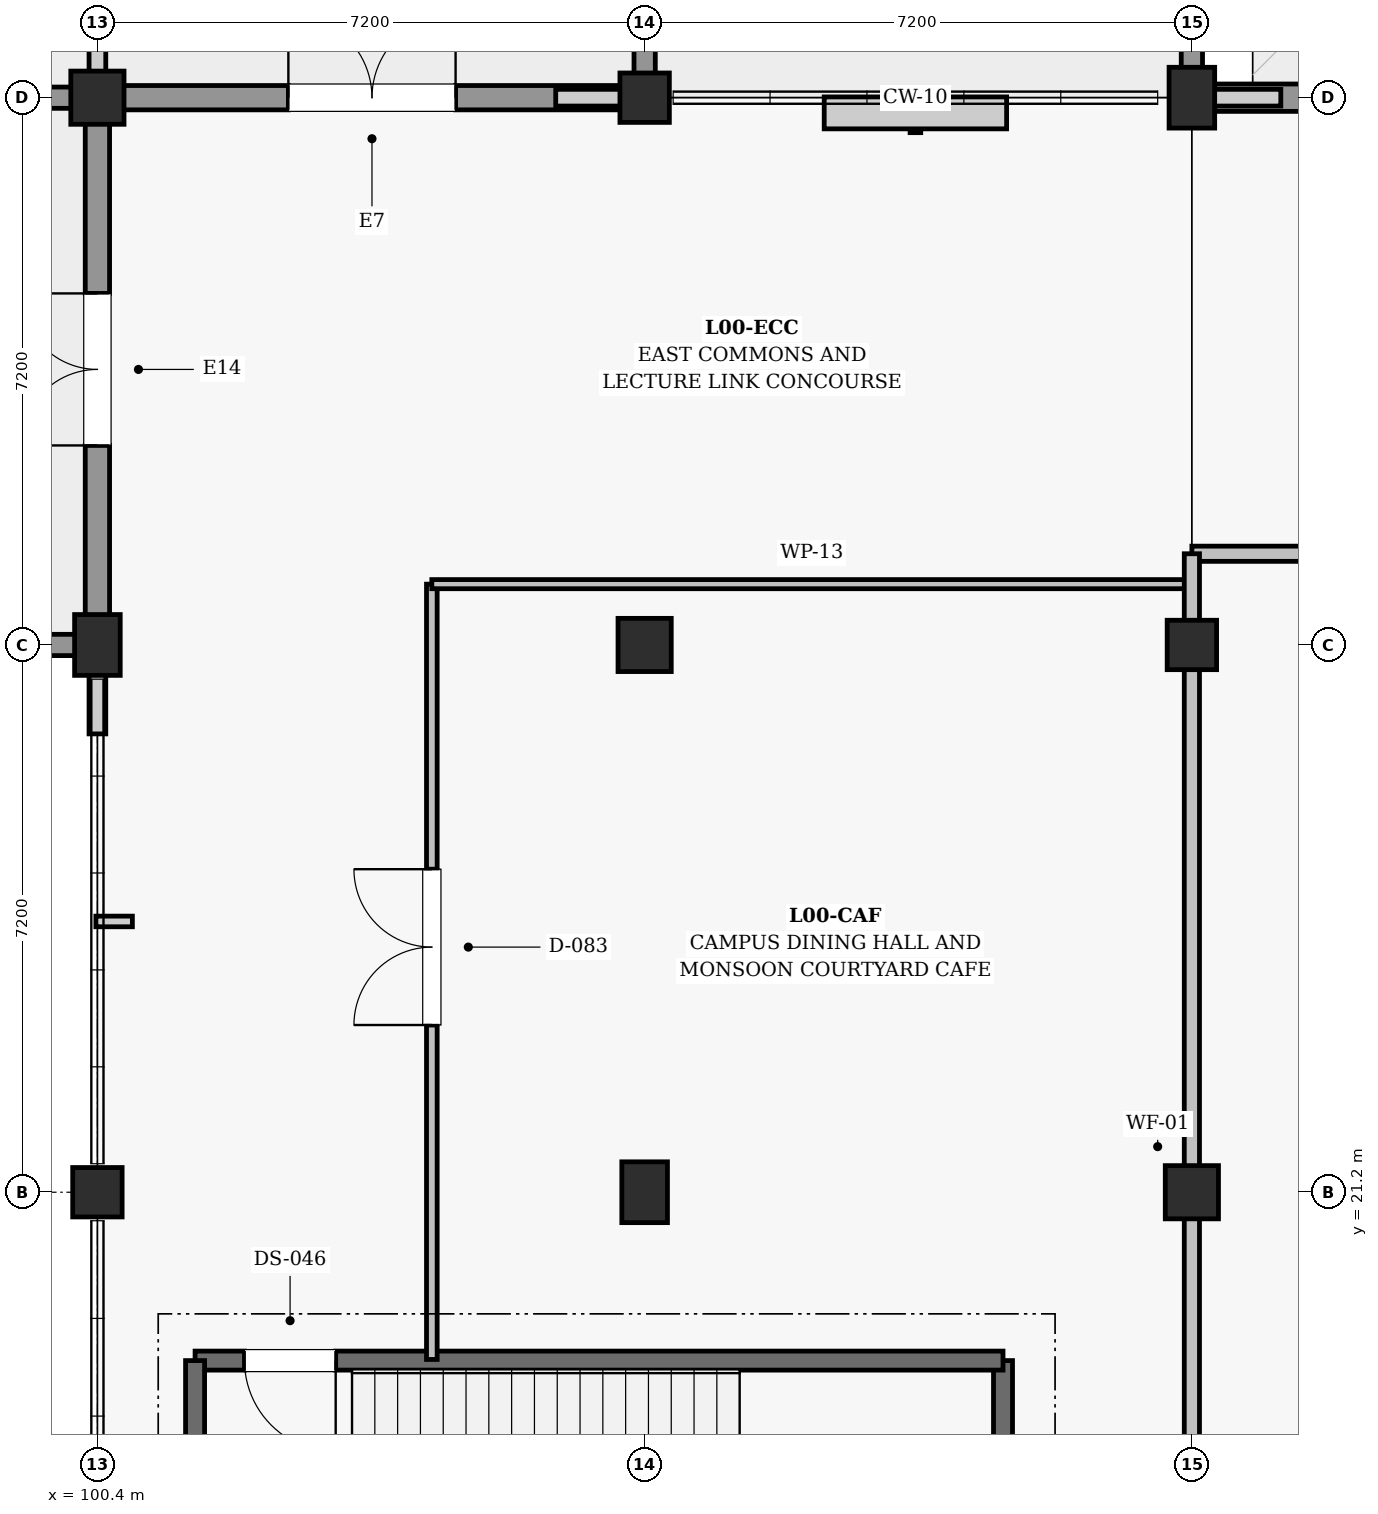
"""IFC4 building model, lengths in metres.
Left out: names, types, materials, properties, quantities, classifications, styles, units other than length and angle.
Written with IfcOpenShell. Run it as: python <this file> out.ifc"""

import sys

from ifc_helpers import new_model, si_unit, direction, frame, frame_2d, origin, origin_2d, place, context, subcontext, project, spatial, polyline, rectangle, outline, extrude, element, fill, save


model = new_model("IFC4")
c1 = context("Model", 3, precision=1e-05, world=origin(), true_north=direction((0.0, 1.0)))
c2 = subcontext(c1, "Body", "Model", "MODEL_VIEW")
j1 = project(units=[si_unit("LENGTHUNIT", "METRE"), si_unit("PLANEANGLEUNIT", "RADIAN")], contexts=[c1])
p1 = place(None, origin())
s1 = spatial("IfcSite", under=j1, at=p1, CompositionType="ELEMENT")
p2 = place(p1, origin())
s2 = spatial("IfcBuilding", under=s1, at=p2, CompositionType="ELEMENT")
p3 = place(p2, origin())
s3 = spatial("IfcBuildingStorey", under=s2, at=p3, CompositionType="ELEMENT", Elevation=0.0)
p4 = place(p3, frame((100.4, 21.2, 0.0), z_axis=(0.0, 0.0, 1.0), x_axis=(1.0, 0.0, 0.0)))
e1 = element("IfcColumn", 1, at=p4, inside=s3, PredefinedType="COLUMN", context=c2, shape_type="SweptSolid", body=[
    extrude(rectangle(XDim=0.65, YDim=0.65, at=origin_2d()), origin(), (0.0, 0.0, 1.0), 5.4),
])
p5 = place(p3, frame((100.4, 28.4, 0.0), z_axis=(0.0, 0.0, 1.0), x_axis=(1.0, 0.0, 0.0)))
e2 = element("IfcColumn", 2, at=p5, inside=s3, PredefinedType="COLUMN", context=c2, shape_type="SweptSolid", body=[
    extrude(rectangle(XDim=0.6, YDim=0.8, at=origin_2d()), origin(), (0.0, 0.0, 1.0), 5.4),
])
p6 = place(p3, frame((100.4, 35.6, 0.0), z_axis=(0.0, 0.0, 1.0), x_axis=(1.0, 0.0, 0.0)))
e3 = element("IfcColumn", 3, at=p6, inside=s3, PredefinedType="COLUMN", context=c2, shape_type="SweptSolid", body=[
    extrude(rectangle(XDim=0.7, YDim=0.7, at=origin_2d()), origin(), (0.0, 0.0, 1.0), 5.4),
])
p7 = place(p3, frame((107.6, 21.2, 0.0), z_axis=(0.0, 0.0, 1.0), x_axis=(1.0, 0.0, 0.0)))
e4 = element("IfcColumn", 4, at=p7, inside=s3, PredefinedType="COLUMN", context=c2, shape_type="SweptSolid", body=[
    extrude(rectangle(XDim=0.6, YDim=0.8, at=origin_2d()), origin(), (0.0, 0.0, 1.0), 5.4),
])
p8 = place(p3, frame((107.6, 28.4, 0.0), z_axis=(0.0, 0.0, 1.0), x_axis=(1.0, 0.0, 0.0)))
e5 = element("IfcColumn", 5, at=p8, inside=s3, PredefinedType="COLUMN", context=c2, shape_type="SweptSolid", body=[
    extrude(rectangle(XDim=0.7, YDim=0.7, at=origin_2d()), origin(), (0.0, 0.0, 1.0), 5.4),
])
p9 = place(p3, frame((107.6, 35.6, 0.0), z_axis=(0.0, 0.0, 1.0), x_axis=(1.0, 0.0, 0.0)))
e6 = element("IfcColumn", 6, at=p9, inside=s3, PredefinedType="COLUMN", context=c2, shape_type="SweptSolid", body=[
    extrude(rectangle(XDim=0.65, YDim=0.65, at=origin_2d()), origin(), (0.0, 0.0, 1.0), 5.4),
])
p10 = place(p3, frame((114.8, 21.2, 0.0), z_axis=(0.0, 0.0, 1.0), x_axis=(1.0, 0.0, 0.0)))
e7 = element("IfcColumn", 7, at=p10, inside=s3, PredefinedType="COLUMN", context=c2, shape_type="SweptSolid", body=[
    extrude(rectangle(XDim=0.7, YDim=0.7, at=origin_2d()), origin(), (0.0, 0.0, 1.0), 5.4),
])
p11 = place(p3, frame((114.8, 28.4, 0.0), z_axis=(0.0, 0.0, 1.0), x_axis=(1.0, 0.0, 0.0)))
e8 = element("IfcColumn", 8, at=p11, inside=s3, PredefinedType="COLUMN", context=c2, shape_type="SweptSolid", body=[
    extrude(rectangle(XDim=0.65, YDim=0.65, at=origin_2d()), origin(), (0.0, 0.0, 1.0), 5.4),
])
p12 = place(p3, frame((114.8, 35.6, 0.0), z_axis=(0.0, 0.0, 1.0), x_axis=(1.0, 0.0, 0.0)))
e9 = element("IfcColumn", 9, at=p12, inside=s3, PredefinedType="COLUMN", context=c2, shape_type="SweptSolid", body=[
    extrude(rectangle(XDim=0.6, YDim=0.8, at=origin_2d()), origin(), (0.0, 0.0, 1.0), 5.4),
])
p13 = place(p3, frame((100.73, 35.6, 0.0), z_axis=(0.0, 0.0, 1.0), x_axis=(1.0, 0.0, 0.0)))
e10 = element("IfcWall", 10, at=p13, inside=s3, PredefinedType="SOLIDWALL", context=c2, shape_type="SweptSolid", body=[
    extrude(rectangle(XDim=6.565, YDim=0.32, at=frame_2d((3.282, 0.0))), origin(), (0.0, 0.0, 1.0), 4.355),
])
p14 = place(p13, frame((2.183, 0.0, 0.0)))
e11 = element("IfcOpeningElement", 11, at=p14, cuts=e10, PredefinedType="OPENING", context=c2, shape_type="SweptSolid", body=[
    extrude(rectangle(XDim=2.2, YDim=2.4, at=frame_2d((1.1, 1.2))), frame((0.0, 0.17, 0.0), z_axis=(0.0, -1.0, 0.0), x_axis=(1.0, 0.0, 0.0)), (0.0, 0.0, 1.0), 0.34),
])
p15 = place(p3, frame((100.4, 28.78, 0.0), z_axis=(0.0, 0.0, 1.0), x_axis=(0.0, 1.0, 0.0)))
e12 = element("IfcWall", 12, at=p15, inside=s3, PredefinedType="SOLIDWALL", context=c2, shape_type="SweptSolid", body=[
    extrude(rectangle(XDim=6.49, YDim=0.32, at=frame_2d((3.245, 0.0))), origin(), (0.0, 0.0, 1.0), 4.435),
])
p16 = place(p15, frame((2.245, 0.0, 0.0)))
e13 = element("IfcOpeningElement", 13, at=p16, cuts=e12, PredefinedType="OPENING", context=c2, shape_type="SweptSolid", body=[
    extrude(rectangle(XDim=2.0, YDim=2.4, at=frame_2d((1.0, 1.2))), frame((0.0, 0.17, 0.0), z_axis=(0.0, -1.0, 0.0), x_axis=(1.0, 0.0, 0.0)), (0.0, 0.0, 1.0), 0.34),
])
p17 = place(p3, frame((93.465, 35.6, 3.3), z_axis=(0.0, 0.0, 1.0), x_axis=(1.0, 0.0, 0.0)))
e14 = element("IfcWall", 14, at=p17, inside=s3, PredefinedType="SOLIDWALL", context=c2, shape_type="SweptSolid", body=[
    extrude(outline(polyline([(0.0, 0.0), (1.721, 0.52), (3.31, 1.06), (4.899, 0.52), (6.62, 0.0), (6.62, 1.12), (0.0, 1.12), (0.0, 0.0)])), frame((0.0, 0.14, 0.0), z_axis=(0.0, -1.0, 0.0), x_axis=(1.0, 0.0, 0.0)), (0.0, 0.0, 1.0), 0.28),
])
p18 = place(p3, frame((93.49, 28.4, 3.3), z_axis=(0.0, 0.0, 1.0), x_axis=(1.0, 0.0, 0.0)))
e15 = element("IfcWall", 15, at=p18, inside=s3, PredefinedType="SOLIDWALL", context=c2, shape_type="SweptSolid", body=[
    extrude(outline(polyline([(0.0, 0.0), (1.728, 0.52), (3.323, 1.06), (4.917, 0.52), (6.645, 0.0), (6.645, 1.12), (0.0, 1.12), (0.0, 0.0)])), frame((0.0, 0.14, 0.0), z_axis=(0.0, -1.0, 0.0), x_axis=(1.0, 0.0, 0.0)), (0.0, 0.0, 1.0), 0.28),
])
p19 = place(p3, frame((107.6, 35.89, 3.3), z_axis=(0.0, 0.0, 1.0), x_axis=(0.0, 1.0, 0.0)))
e16 = element("IfcWall", 16, at=p19, inside=s3, PredefinedType="SOLIDWALL", context=c2, shape_type="SweptSolid", body=[
    extrude(outline(polyline([(0.0, 0.0), (1.754, 0.52), (3.373, 1.06), (4.991, 0.52), (6.745, 0.0), (6.745, 1.12), (0.0, 1.12), (0.0, 0.0)])), frame((0.0, 0.14, 0.0), z_axis=(0.0, -1.0, 0.0), x_axis=(1.0, 0.0, 0.0)), (0.0, 0.0, 1.0), 0.28),
])
p20 = place(p3, frame((114.8, 35.965, 3.3), z_axis=(0.0, 0.0, 1.0), x_axis=(0.0, 1.0, 0.0)))
e17 = element("IfcWall", 17, at=p20, inside=s3, PredefinedType="SOLIDWALL", context=c2, shape_type="SweptSolid", body=[
    extrude(outline(polyline([(0.0, 0.0), (1.721, 0.52), (3.31, 1.06), (4.899, 0.52), (6.62, 0.0), (6.62, 1.12), (0.0, 1.12), (0.0, 0.0)])), frame((0.0, 0.14, 0.0), z_axis=(0.0, -1.0, 0.0), x_axis=(1.0, 0.0, 0.0)), (0.0, 0.0, 1.0), 0.28),
])
p21 = place(p3, frame((115.08, 35.6, 0.0), z_axis=(0.0, 0.0, 1.0), x_axis=(1.0, 0.0, 0.0)))
e18 = element("IfcWall", 18, at=p21, inside=s3, PredefinedType="SOLIDWALL", context=c2, shape_type="SweptSolid", body=[
    extrude(rectangle(XDim=6.59, YDim=0.36, at=frame_2d((3.295, 0.0))), origin(), (0.0, 0.0, 1.0), 4.5),
])
p22 = place(p21, frame((2.195, 0.0, 0.0)))
e19 = element("IfcOpeningElement", 19, at=p22, cuts=e18, PredefinedType="OPENING", context=c2, shape_type="SweptSolid", body=[
    extrude(rectangle(XDim=2.2, YDim=2.4, at=frame_2d((1.1, 1.2))), frame((0.0, 0.19, 0.0), z_axis=(0.0, -1.0, 0.0), x_axis=(1.0, 0.0, 0.0)), (0.0, 0.0, 1.0), 0.38),
])
p23 = place(p3, frame((112.315, 15.085, 0.0), z_axis=(0.0, 0.0, 1.0), x_axis=(0.0, 1.0, 0.0)))
e20 = element("IfcWall", 20, at=p23, inside=s3, PredefinedType="SHEAR", context=c2, shape_type="SweptSolid", body=[
    extrude(rectangle(XDim=3.9, YDim=0.25, at=frame_2d((1.95, 0.0))), origin(), (0.0, 0.0, 1.0), 5.115),
])
p24 = place(p3, frame((112.315, 18.985, 0.0), z_axis=(0.0, 0.0, 1.0), x_axis=(-1.0, 0.0, 0.0)))
e21 = element("IfcWall", 21, at=p24, inside=s3, PredefinedType="SHEAR", context=c2, shape_type="SweptSolid", body=[
    extrude(rectangle(XDim=10.63, YDim=0.25, at=frame_2d((5.315, 0.0))), origin(), (0.0, 0.0, 1.0), 5.115),
])
p25 = place(p24, frame((8.78, 0.0, 0.0)))
e22 = element("IfcOpeningElement", 22, at=p25, cuts=e21, PredefinedType="OPENING", context=c2, shape_type="SweptSolid", body=[
    extrude(rectangle(XDim=1.2, YDim=2.15, at=frame_2d((0.6, 1.075))), frame((0.0, 0.135, 0.0), z_axis=(0.0, -1.0, 0.0), x_axis=(1.0, 0.0, 0.0)), (0.0, 0.0, 1.0), 0.27),
])
p26 = place(p3, frame((101.685, 18.985, 0.0), z_axis=(0.0, 0.0, 1.0), x_axis=(0.0, -1.0, 0.0)))
e23 = element("IfcWall", 23, at=p26, inside=s3, PredefinedType="SHEAR", context=c2, shape_type="SweptSolid", body=[
    extrude(rectangle(XDim=3.9, YDim=0.25, at=frame_2d((1.95, 0.0))), origin(), (0.0, 0.0, 1.0), 5.115),
])
p27 = place(p3, frame((104.8, 19.0, 0.0), z_axis=(0.0, 0.0, 1.0), x_axis=(0.0, 1.0, 0.0)))
e24 = element("IfcWall", 24, at=p27, inside=s3, PredefinedType="PARTITIONING", context=c2, shape_type="SweptSolid", body=[
    extrude(rectangle(XDim=10.2, YDim=0.14, at=frame_2d((5.1, 0.0))), origin(), (0.0, 0.0, 1.0), 4.31),
])
p28 = place(p27, frame((4.4, 0.0, 0.0)))
e25 = element("IfcOpeningElement", 25, at=p28, cuts=e24, PredefinedType="OPENING", context=c2, shape_type="SweptSolid", body=[
    extrude(rectangle(XDim=2.05, YDim=2.3, at=frame_2d((1.025, 1.15))), frame((0.0, 0.08, 0.0), z_axis=(0.0, -1.0, 0.0), x_axis=(1.0, 0.0, 0.0)), (0.0, 0.0, 1.0), 0.16),
])
p29 = place(p3, frame((104.8, 29.2, 0.0), z_axis=(0.0, 0.0, 1.0), x_axis=(1.0, 0.0, 0.0)))
e26 = element("IfcWall", 26, at=p29, inside=s3, PredefinedType="PARTITIONING", context=c2, shape_type="SweptSolid", body=[
    extrude(rectangle(XDim=10.0, YDim=0.12, at=frame_2d((5.0, 0.0))), origin(), (0.0, 0.0, 1.0), 4.36),
])
p30 = place(p3, frame((114.8, 29.6, 0.0), z_axis=(0.0, 0.0, 1.0), x_axis=(1.0, 0.0, 0.0)))
e27 = element("IfcWall", 27, at=p30, inside=s3, PredefinedType="SOLIDWALL", context=c2, shape_type="SweptSolid", body=[
    extrude(rectangle(XDim=27.6, YDim=0.2, at=frame_2d((13.8, 0.0))), origin(), (0.0, 0.0, 1.0), 4.34),
])
p31 = place(p30, frame((4.6, 0.0, 0.0)))
e28 = element("IfcOpeningElement", 28, at=p31, cuts=e27, PredefinedType="OPENING", context=c2, shape_type="SweptSolid", body=[
    extrude(rectangle(XDim=1.8, YDim=2.25, at=frame_2d((0.9, 1.125))), frame((0.0, 0.11, 0.0), z_axis=(0.0, -1.0, 0.0), x_axis=(1.0, 0.0, 0.0)), (0.0, 0.0, 1.0), 0.22),
])
p32 = place(p30, frame((19.0, 0.0, 0.0)))
e29 = element("IfcOpeningElement", 29, at=p32, cuts=e27, PredefinedType="OPENING", context=c2, shape_type="SweptSolid", body=[
    extrude(rectangle(XDim=1.8, YDim=2.25, at=frame_2d((0.9, 1.125))), frame((0.0, 0.11, 0.0), z_axis=(0.0, -1.0, 0.0), x_axis=(1.0, 0.0, 0.0)), (0.0, 0.0, 1.0), 0.22),
])
p33 = place(p3, frame((114.8, 14.0, 0.0), z_axis=(0.0, 0.0, 1.0), x_axis=(0.0, 1.0, 0.0)))
e30 = element("IfcWall", 30, at=p33, inside=s3, PredefinedType="SOLIDWALL", context=c2, shape_type="SweptSolid", body=[
    extrude(rectangle(XDim=15.6, YDim=0.2, at=frame_2d((7.8, 0.0))), origin(), (0.0, 0.0, 1.0), 4.26),
])
p34 = place(p14, origin())
e31 = element("IfcDoor", 31, at=p34, inside=s3, OperationType="DOUBLE_DOOR_SINGLE_SWING", PredefinedType="DOOR", context=c2, shape_type="SweptSolid", body=[
    extrude(rectangle(XDim=2.2, YDim=2.4, at=frame_2d((1.1, 1.2))), frame((0.0, 0.025, 0.0), z_axis=(0.0, -1.0, 0.0), x_axis=(1.0, 0.0, 0.0)), (0.0, 0.0, 1.0), 0.05),
])
fill(e11, e31)
p35 = place(p16, origin())
e32 = element("IfcDoor", 32, at=p35, inside=s3, OperationType="DOUBLE_DOOR_SINGLE_SWING", PredefinedType="DOOR", context=c2, shape_type="SweptSolid", body=[
    extrude(rectangle(XDim=2.0, YDim=2.4, at=frame_2d((1.0, 1.2))), frame((0.0, 0.025, 0.0), z_axis=(0.0, -1.0, 0.0), x_axis=(1.0, 0.0, 0.0)), (0.0, 0.0, 1.0), 0.05),
])
fill(e13, e32)
p36 = place(p25, origin())
e33 = element("IfcDoor", 33, at=p36, inside=s3, OperationType="SINGLE_SWING_LEFT", PredefinedType="DOOR", context=c2, shape_type="SweptSolid", body=[
    extrude(rectangle(XDim=1.2, YDim=2.15, at=frame_2d((0.6, 1.075))), frame((0.0, 0.025, 0.0), z_axis=(0.0, -1.0, 0.0), x_axis=(1.0, 0.0, 0.0)), (0.0, 0.0, 1.0), 0.05),
])
fill(e22, e33)
p37 = place(p28, origin())
e34 = element("IfcDoor", 34, at=p37, inside=s3, OperationType="DOUBLE_DOOR_SINGLE_SWING", PredefinedType="DOOR", context=c2, shape_type="SweptSolid", body=[
    extrude(rectangle(XDim=2.05, YDim=2.3, at=frame_2d((1.025, 1.15))), frame((0.0, 0.025, 0.0), z_axis=(0.0, -1.0, 0.0), x_axis=(1.0, 0.0, 0.0)), (0.0, 0.0, 1.0), 0.05),
])
fill(e25, e34)
save(model, sys.argv[1])
